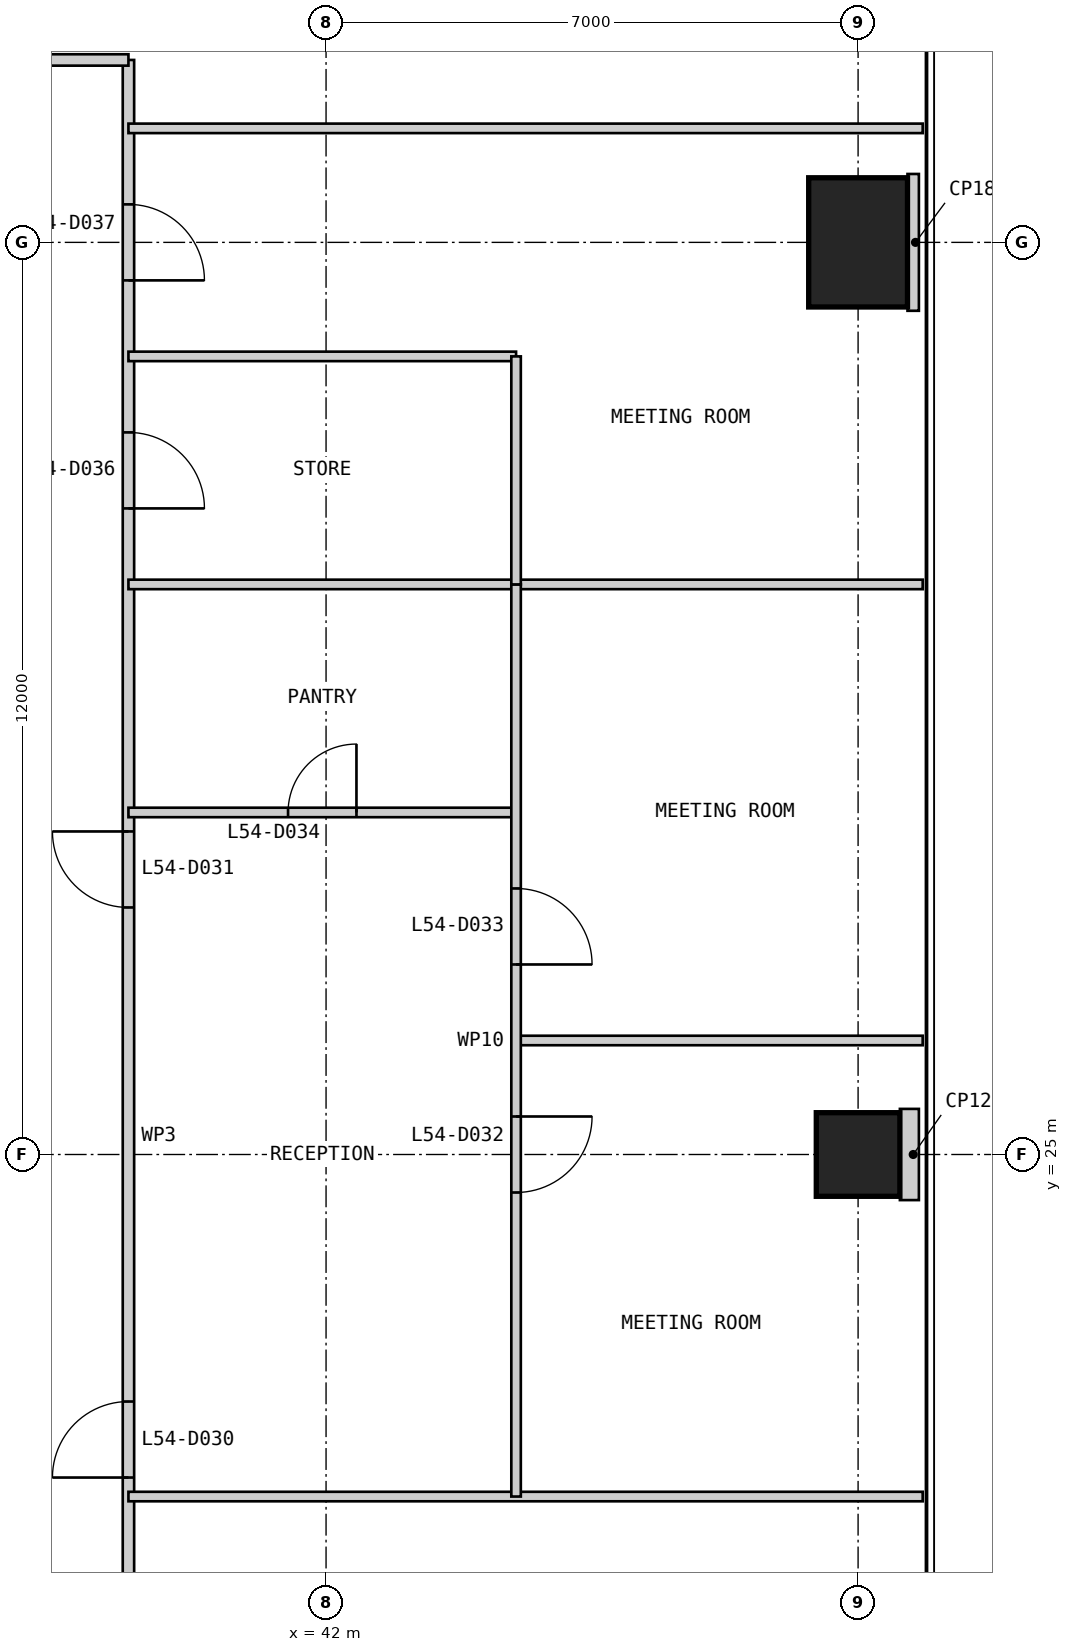
"""IFC4 building model, lengths in metres.
Left out: names, types, materials, properties, quantities, classifications, styles, units other than length and angle.
Written with IfcOpenShell. Run it as: python <this file> out.ifc"""

import sys

from ifc_helpers import new_model, si_unit, direction, frame, frame_2d, origin, origin_2d, place, context, subcontext, project, spatial, rectangle, extrude, element, fill, save


model = new_model("IFC4")
c1 = context("Model", 3, precision=1e-05, world=origin(), true_north=direction((0.0, 1.0)))
c2 = subcontext(c1, "Body", "Model", "MODEL_VIEW")
j1 = project(units=[si_unit("LENGTHUNIT", "METRE"), si_unit("PLANEANGLEUNIT", "RADIAN")], contexts=[c1])
p1 = place(None, origin())
s1 = spatial("IfcSite", under=j1, at=p1, CompositionType="ELEMENT")
p2 = place(p1, origin())
s2 = spatial("IfcBuilding", under=s1, at=p2, CompositionType="ELEMENT")
p3 = place(p2, frame((0.0, 0.0, 229.8)))
s3 = spatial("IfcBuildingStorey", under=s2, at=p3, CompositionType="ELEMENT", Elevation=229.8)
p4 = place(p3, frame((49.0, 25.0, 0.0), z_axis=(0.0, 0.0, 1.0), x_axis=(1.0, 0.0, 0.0)))
e1 = element("IfcColumn", 1, at=p4, inside=s3, PredefinedType="COLUMN", context=c2, shape_type="SweptSolid", body=[
    extrude(rectangle(XDim=1.1, YDim=1.1, at=origin_2d()), origin(), (0.0, 0.0, 1.0), 4.0),
])
p5 = place(p3, frame((49.0, 37.0, 0.0), z_axis=(0.0, 0.0, 1.0), x_axis=(1.0, 0.0, 0.0)))
e2 = element("IfcColumn", 2, at=p5, inside=s3, PredefinedType="COLUMN", context=c2, shape_type="SweptSolid", body=[
    extrude(rectangle(XDim=1.3, YDim=1.7, at=origin_2d()), origin(), (0.0, 0.0, 1.0), 4.0),
])
p6 = place(p3, frame((39.4, 10.6, 0.0), z_axis=(0.0, 0.0, 1.0), x_axis=(0.0, 1.0, 0.0)))
e3 = element("IfcWall", 3, at=p6, inside=s3, PredefinedType="PARTITIONING", context=c2, shape_type="SweptSolid", body=[
    extrude(rectangle(XDim=28.8, YDim=0.15, at=frame_2d((14.4, 0.0))), origin(), (0.0, 0.0, 1.0), 3.8),
])
p7 = place(p6, frame((10.15, 0.0, 0.0)))
e4 = element("IfcOpeningElement", 4, at=p7, cuts=e3, PredefinedType="OPENING", context=c2, shape_type="SweptSolid", body=[
    extrude(rectangle(XDim=1.0, YDim=2.2, at=frame_2d((0.5, 1.1))), frame((0.0, 0.085, 0.0), z_axis=(0.0, -1.0, 0.0), x_axis=(1.0, 0.0, 0.0)), (0.0, 0.0, 1.0), 0.17),
])
p8 = place(p6, frame((17.65, 0.0, 0.0)))
e5 = element("IfcOpeningElement", 5, at=p8, cuts=e3, PredefinedType="OPENING", context=c2, shape_type="SweptSolid", body=[
    extrude(rectangle(XDim=1.0, YDim=2.2, at=frame_2d((0.5, 1.1))), frame((0.0, 0.085, 0.0), z_axis=(0.0, -1.0, 0.0), x_axis=(1.0, 0.0, 0.0)), (0.0, 0.0, 1.0), 0.17),
])
p9 = place(p6, frame((4.9, 0.0, 0.0)))
e6 = element("IfcOpeningElement", 6, at=p9, cuts=e3, PredefinedType="OPENING", context=c2, shape_type="SweptSolid", body=[
    extrude(rectangle(XDim=1.0, YDim=2.2, at=frame_2d((0.5, 1.1))), frame((0.0, 0.085, 0.0), z_axis=(0.0, -1.0, 0.0), x_axis=(1.0, 0.0, 0.0)), (0.0, 0.0, 1.0), 0.17),
])
p10 = place(p6, frame((22.9, 0.0, 0.0)))
e7 = element("IfcOpeningElement", 7, at=p10, cuts=e3, PredefinedType="OPENING", context=c2, shape_type="SweptSolid", body=[
    extrude(rectangle(XDim=1.0, YDim=2.2, at=frame_2d((0.5, 1.1))), frame((0.0, 0.085, 0.0), z_axis=(0.0, -1.0, 0.0), x_axis=(1.0, 0.0, 0.0)), (0.0, 0.0, 1.0), 0.17),
])
p11 = place(p6, frame((25.9, 0.0, 0.0)))
e8 = element("IfcOpeningElement", 8, at=p11, cuts=e3, PredefinedType="OPENING", context=c2, shape_type="SweptSolid", body=[
    extrude(rectangle(XDim=1.0, YDim=2.2, at=frame_2d((0.5, 1.1))), frame((0.0, 0.085, 0.0), z_axis=(0.0, -1.0, 0.0), x_axis=(1.0, 0.0, 0.0)), (0.0, 0.0, 1.0), 0.17),
])
p12 = place(p3, frame((49.85, 20.5, 0.0), z_axis=(0.0, 0.0, 1.0), x_axis=(-1.0, 0.0, 0.0)))
e9 = element("IfcWall", 9, at=p12, inside=s3, PredefinedType="PARTITIONING", context=c2, shape_type="SweptSolid", body=[
    extrude(rectangle(XDim=10.45, YDim=0.125, at=frame_2d((5.225, 0.0))), origin(), (0.0, 0.0, 1.0), 3.8),
])
p13 = place(p3, frame((49.85, 26.5, 0.0), z_axis=(0.0, 0.0, 1.0), x_axis=(-1.0, 0.0, 0.0)))
e10 = element("IfcWall", 10, at=p13, inside=s3, PredefinedType="PARTITIONING", context=c2, shape_type="SweptSolid", body=[
    extrude(rectangle(XDim=5.35, YDim=0.125, at=frame_2d((2.675, 0.0))), origin(), (0.0, 0.0, 1.0), 3.8),
])
p14 = place(p3, frame((44.5, 29.5, 0.0), z_axis=(0.0, 0.0, 1.0), x_axis=(-1.0, 0.0, 0.0)))
e11 = element("IfcWall", 11, at=p14, inside=s3, PredefinedType="PARTITIONING", context=c2, shape_type="SweptSolid", body=[
    extrude(rectangle(XDim=5.1, YDim=0.125, at=frame_2d((2.55, 0.0))), origin(), (0.0, 0.0, 1.0), 3.8),
])
p15 = place(p14, frame((2.1, 0.0, 0.0)))
e12 = element("IfcOpeningElement", 12, at=p15, cuts=e11, PredefinedType="OPENING", context=c2, shape_type="SweptSolid", body=[
    extrude(rectangle(XDim=0.9, YDim=2.2, at=frame_2d((0.45, 1.1))), frame((0.0, 0.073, 0.0), z_axis=(0.0, -1.0, 0.0), x_axis=(1.0, 0.0, 0.0)), (0.0, 0.0, 1.0), 0.145),
])
p16 = place(p3, frame((49.85, 32.5, 0.0), z_axis=(0.0, 0.0, 1.0), x_axis=(-1.0, 0.0, 0.0)))
e13 = element("IfcWall", 13, at=p16, inside=s3, PredefinedType="PARTITIONING", context=c2, shape_type="SweptSolid", body=[
    extrude(rectangle(XDim=10.45, YDim=0.125, at=frame_2d((5.225, 0.0))), origin(), (0.0, 0.0, 1.0), 3.8),
])
p17 = place(p3, frame((44.5, 35.5, 0.0), z_axis=(0.0, 0.0, 1.0), x_axis=(-1.0, 0.0, 0.0)))
e14 = element("IfcWall", 14, at=p17, inside=s3, PredefinedType="PARTITIONING", context=c2, shape_type="SweptSolid", body=[
    extrude(rectangle(XDim=5.1, YDim=0.125, at=frame_2d((2.55, 0.0))), origin(), (0.0, 0.0, 1.0), 3.8),
])
p18 = place(p3, frame((44.5, 20.5, 0.0), z_axis=(0.0, 0.0, 1.0), x_axis=(0.0, 1.0, 0.0)))
e15 = element("IfcWall", 15, at=p18, inside=s3, PredefinedType="PARTITIONING", context=c2, shape_type="SweptSolid", body=[
    extrude(rectangle(XDim=12.0, YDim=0.125, at=frame_2d((6.0, 0.0))), origin(), (0.0, 0.0, 1.0), 3.8),
])
p19 = place(p18, frame((4.0, 0.0, 0.0)))
e16 = element("IfcOpeningElement", 16, at=p19, cuts=e15, PredefinedType="OPENING", context=c2, shape_type="SweptSolid", body=[
    extrude(rectangle(XDim=1.0, YDim=2.2, at=frame_2d((0.5, 1.1))), frame((0.0, 0.073, 0.0), z_axis=(0.0, -1.0, 0.0), x_axis=(1.0, 0.0, 0.0)), (0.0, 0.0, 1.0), 0.145),
])
p20 = place(p18, frame((7.0, 0.0, 0.0)))
e17 = element("IfcOpeningElement", 17, at=p20, cuts=e15, PredefinedType="OPENING", context=c2, shape_type="SweptSolid", body=[
    extrude(rectangle(XDim=1.0, YDim=2.2, at=frame_2d((0.5, 1.1))), frame((0.0, 0.073, 0.0), z_axis=(0.0, -1.0, 0.0), x_axis=(1.0, 0.0, 0.0)), (0.0, 0.0, 1.0), 0.145),
])
p21 = place(p3, frame((44.5, 32.5, 0.0), z_axis=(0.0, 0.0, 1.0), x_axis=(0.0, 1.0, 0.0)))
e18 = element("IfcWall", 18, at=p21, inside=s3, PredefinedType="PARTITIONING", context=c2, shape_type="SweptSolid", body=[
    extrude(rectangle(XDim=3.0, YDim=0.125, at=frame_2d((1.5, 0.0))), origin(), (0.0, 0.0, 1.0), 3.8),
])
p22 = place(p3, frame((39.4, 39.4, 0.0), z_axis=(0.0, 0.0, 1.0), x_axis=(-1.0, 0.0, 0.0)))
e19 = element("IfcWall", 19, at=p22, inside=s3, PredefinedType="PARTITIONING", context=c2, shape_type="SweptSolid", body=[
    extrude(rectangle(XDim=28.8, YDim=0.15, at=frame_2d((14.4, 0.0))), origin(), (0.0, 0.0, 1.0), 3.8),
])
p23 = place(p22, frame((10.15, 0.0, 0.0)))
e20 = element("IfcOpeningElement", 20, at=p23, cuts=e19, PredefinedType="OPENING", context=c2, shape_type="SweptSolid", body=[
    extrude(rectangle(XDim=1.0, YDim=2.2, at=frame_2d((0.5, 1.1))), frame((0.0, 0.085, 0.0), z_axis=(0.0, -1.0, 0.0), x_axis=(1.0, 0.0, 0.0)), (0.0, 0.0, 1.0), 0.17),
])
p24 = place(p22, frame((17.65, 0.0, 0.0)))
e21 = element("IfcOpeningElement", 21, at=p24, cuts=e19, PredefinedType="OPENING", context=c2, shape_type="SweptSolid", body=[
    extrude(rectangle(XDim=1.0, YDim=2.2, at=frame_2d((0.5, 1.1))), frame((0.0, 0.085, 0.0), z_axis=(0.0, -1.0, 0.0), x_axis=(1.0, 0.0, 0.0)), (0.0, 0.0, 1.0), 0.17),
])
p25 = place(p22, frame((4.9, 0.0, 0.0)))
e22 = element("IfcOpeningElement", 22, at=p25, cuts=e19, PredefinedType="OPENING", context=c2, shape_type="SweptSolid", body=[
    extrude(rectangle(XDim=1.0, YDim=2.2, at=frame_2d((0.5, 1.1))), frame((0.0, 0.085, 0.0), z_axis=(0.0, -1.0, 0.0), x_axis=(1.0, 0.0, 0.0)), (0.0, 0.0, 1.0), 0.17),
])
p26 = place(p22, frame((22.9, 0.0, 0.0)))
e23 = element("IfcOpeningElement", 23, at=p26, cuts=e19, PredefinedType="OPENING", context=c2, shape_type="SweptSolid", body=[
    extrude(rectangle(XDim=1.0, YDim=2.2, at=frame_2d((0.5, 1.1))), frame((0.0, 0.085, 0.0), z_axis=(0.0, -1.0, 0.0), x_axis=(1.0, 0.0, 0.0)), (0.0, 0.0, 1.0), 0.17),
])
p27 = place(p22, frame((25.9, 0.0, 0.0)))
e24 = element("IfcOpeningElement", 24, at=p27, cuts=e19, PredefinedType="OPENING", context=c2, shape_type="SweptSolid", body=[
    extrude(rectangle(XDim=1.0, YDim=2.2, at=frame_2d((0.5, 1.1))), frame((0.0, 0.085, 0.0), z_axis=(0.0, -1.0, 0.0), x_axis=(1.0, 0.0, 0.0)), (0.0, 0.0, 1.0), 0.17),
])
p28 = place(p3, frame((49.85, 38.5, 0.0), z_axis=(0.0, 0.0, 1.0), x_axis=(-1.0, 0.0, 0.0)))
e25 = element("IfcWall", 25, at=p28, inside=s3, PredefinedType="PARTITIONING", context=c2, shape_type="SweptSolid", body=[
    extrude(rectangle(XDim=10.45, YDim=0.125, at=frame_2d((5.225, 0.0))), origin(), (0.0, 0.0, 1.0), 3.8),
])
p29 = place(p3, frame((49.8, 25.0, 0.0), z_axis=(0.0, 0.0, 1.0), x_axis=(-1.0, 0.0, 0.0)))
e26 = element("IfcWall", 26, at=p29, inside=s3, PredefinedType="PARTITIONING", context=c2, shape_type="SweptSolid", body=[
    extrude(rectangle(XDim=0.25, YDim=1.2, at=frame_2d((0.125, 0.0))), origin(), (0.0, 0.0, 1.0), 3.8),
])
p30 = place(p3, frame((49.8, 37.0, 0.0), z_axis=(0.0, 0.0, 1.0), x_axis=(-1.0, 0.0, 0.0)))
e27 = element("IfcWall", 27, at=p30, inside=s3, PredefinedType="PARTITIONING", context=c2, shape_type="SweptSolid", body=[
    extrude(rectangle(XDim=0.15, YDim=1.8, at=frame_2d((0.075, 0.0))), origin(), (0.0, 0.0, 1.0), 3.8),
])
p31 = place(p7, origin())
e28 = element("IfcDoor", 28, at=p31, inside=s3, OperationType="SINGLE_SWING_LEFT", PredefinedType="DOOR", context=c2, shape_type="SweptSolid", body=[
    extrude(rectangle(XDim=1.0, YDim=2.2, at=frame_2d((0.5, 1.1))), frame((0.0, 0.025, 0.0), z_axis=(0.0, -1.0, 0.0), x_axis=(1.0, 0.0, 0.0)), (0.0, 0.0, 1.0), 0.05),
])
fill(e4, e28)
p32 = place(p8, origin())
e29 = element("IfcDoor", 29, at=p32, inside=s3, OperationType="SINGLE_SWING_RIGHT", PredefinedType="DOOR", context=c2, shape_type="SweptSolid", body=[
    extrude(rectangle(XDim=1.0, YDim=2.2, at=frame_2d((0.5, 1.1))), frame((0.0, 0.025, 0.0), z_axis=(0.0, -1.0, 0.0), x_axis=(1.0, 0.0, 0.0)), (0.0, 0.0, 1.0), 0.05),
])
fill(e5, e29)
p33 = place(p19, frame((1.0, 0.0, 0.0), z_axis=(0.0, 0.0, 1.0), x_axis=(-1.0, 0.0, 0.0)))
e30 = element("IfcDoor", 30, at=p33, inside=s3, OperationType="SINGLE_SWING_LEFT", PredefinedType="DOOR", context=c2, shape_type="SweptSolid", body=[
    extrude(rectangle(XDim=1.0, YDim=2.2, at=frame_2d((0.5, 1.1))), frame((0.0, 0.025, 0.0), z_axis=(0.0, -1.0, 0.0), x_axis=(1.0, 0.0, 0.0)), (0.0, 0.0, 1.0), 0.05),
])
fill(e16, e30)
p34 = place(p20, frame((1.0, 0.0, 0.0), z_axis=(0.0, 0.0, 1.0), x_axis=(-1.0, 0.0, 0.0)))
e31 = element("IfcDoor", 31, at=p34, inside=s3, OperationType="SINGLE_SWING_RIGHT", PredefinedType="DOOR", context=c2, shape_type="SweptSolid", body=[
    extrude(rectangle(XDim=1.0, YDim=2.2, at=frame_2d((0.5, 1.1))), frame((0.0, 0.025, 0.0), z_axis=(0.0, -1.0, 0.0), x_axis=(1.0, 0.0, 0.0)), (0.0, 0.0, 1.0), 0.05),
])
fill(e17, e31)
p35 = place(p15, frame((0.9, 0.0, 0.0), z_axis=(0.0, 0.0, 1.0), x_axis=(-1.0, 0.0, 0.0)))
e32 = element("IfcDoor", 32, at=p35, inside=s3, OperationType="SINGLE_SWING_RIGHT", PredefinedType="DOOR", context=c2, shape_type="SweptSolid", body=[
    extrude(rectangle(XDim=0.9, YDim=2.2, at=frame_2d((0.45, 1.1))), frame((0.0, 0.025, 0.0), z_axis=(0.0, -1.0, 0.0), x_axis=(1.0, 0.0, 0.0)), (0.0, 0.0, 1.0), 0.05),
])
fill(e12, e32)
p36 = place(p10, frame((1.0, 0.0, 0.0), z_axis=(0.0, 0.0, 1.0), x_axis=(-1.0, 0.0, 0.0)))
e33 = element("IfcDoor", 33, at=p36, inside=s3, OperationType="SINGLE_SWING_RIGHT", PredefinedType="DOOR", context=c2, shape_type="SweptSolid", body=[
    extrude(rectangle(XDim=1.0, YDim=2.2, at=frame_2d((0.5, 1.1))), frame((0.0, 0.025, 0.0), z_axis=(0.0, -1.0, 0.0), x_axis=(1.0, 0.0, 0.0)), (0.0, 0.0, 1.0), 0.05),
])
fill(e7, e33)
p37 = place(p11, frame((1.0, 0.0, 0.0), z_axis=(0.0, 0.0, 1.0), x_axis=(-1.0, 0.0, 0.0)))
e34 = element("IfcDoor", 34, at=p37, inside=s3, OperationType="SINGLE_SWING_RIGHT", PredefinedType="DOOR", context=c2, shape_type="SweptSolid", body=[
    extrude(rectangle(XDim=1.0, YDim=2.2, at=frame_2d((0.5, 1.1))), frame((0.0, 0.025, 0.0), z_axis=(0.0, -1.0, 0.0), x_axis=(1.0, 0.0, 0.0)), (0.0, 0.0, 1.0), 0.05),
])
fill(e8, e34)
save(model, sys.argv[1])
